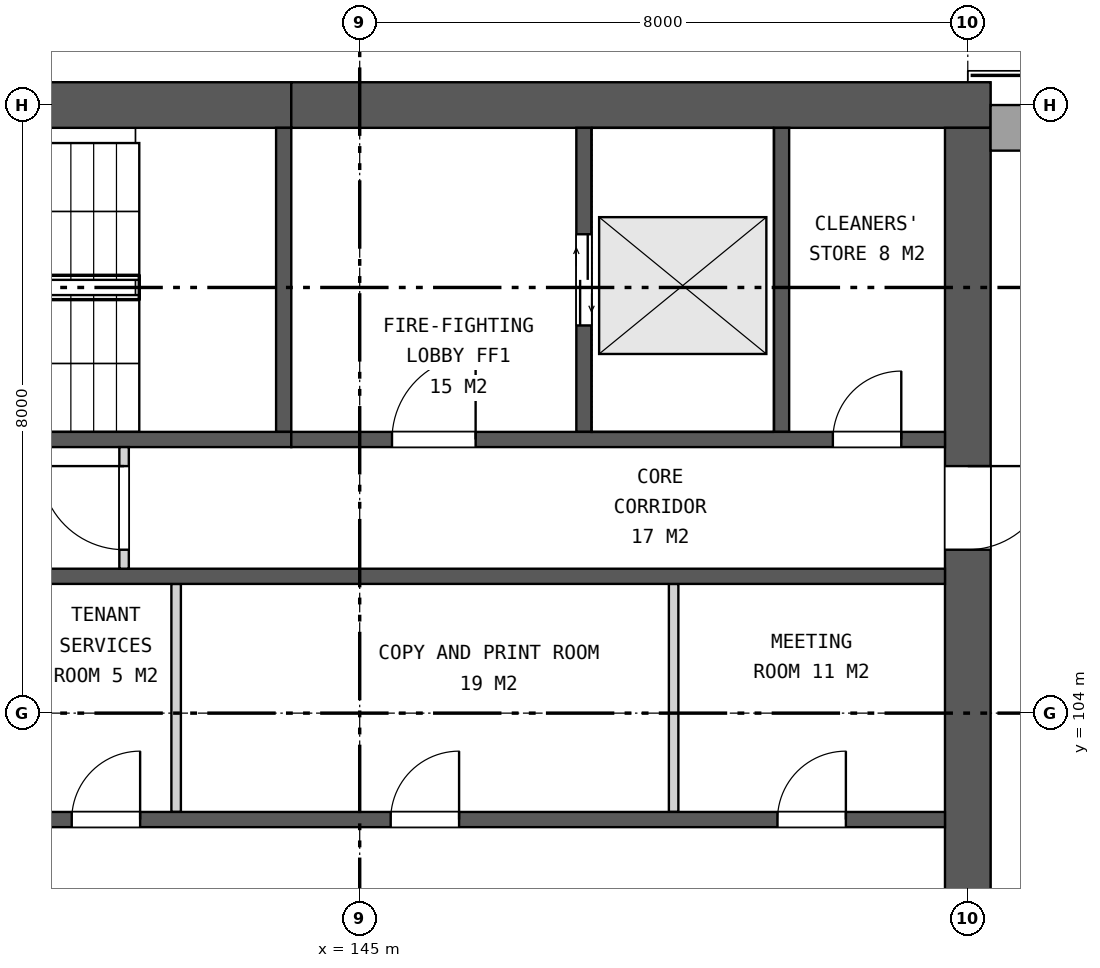
"""IFC4 building model, lengths in metres.
Left out: names, types, materials, properties, quantities, classifications, styles, units other than length and angle.
Written with IfcOpenShell. Run it as: python <this file> out.ifc"""

import sys

from ifc_helpers import new_model, si_unit, direction, frame, frame_2d, origin, place, context, subcontext, project, spatial, rectangle, extrude, element, fill, save


model = new_model("IFC4")
c1 = context("Model", 3, precision=1e-05, world=origin(), true_north=direction((0.0, 1.0)))
c2 = subcontext(c1, "Body", "Model", "MODEL_VIEW")
j1 = project(units=[si_unit("LENGTHUNIT", "METRE"), si_unit("PLANEANGLEUNIT", "RADIAN")], contexts=[c1])
p1 = place(None, origin())
s1 = spatial("IfcSite", under=j1, at=p1, CompositionType="ELEMENT")
p2 = place(p1, origin())
s2 = spatial("IfcBuilding", under=s1, at=p2, CompositionType="ELEMENT")
p3 = place(p2, frame((0.0, 0.0, 178.9)))
s3 = spatial("IfcBuildingStorey", under=s2, at=p3, CompositionType="ELEMENT", Elevation=178.9)
p4 = place(p3, frame((137.0, 112.0, 0.0), z_axis=(0.0, 0.0, 1.0), x_axis=(1.0, 0.0, 0.0)))
e1 = element("IfcWall", 1, at=p4, inside=s3, PredefinedType="SHEAR", context=c2, shape_type="SweptSolid", body=[
    extrude(rectangle(XDim=7.1, YDim=0.6, at=frame_2d((3.55, 0.0))), origin(), (0.0, 0.0, 1.0), 4.2),
])
p5 = place(p3, frame((144.1, 112.0, 0.0), z_axis=(0.0, 0.0, 1.0), x_axis=(1.0, 0.0, 0.0)))
e2 = element("IfcWall", 2, at=p5, inside=s3, PredefinedType="SHEAR", context=c2, shape_type="SweptSolid", body=[
    extrude(rectangle(XDim=9.2, YDim=0.6, at=frame_2d((4.6, 0.0))), origin(), (0.0, 0.0, 1.0), 4.2),
])
p6 = place(p3, frame((153.0, 88.3, 0.0), z_axis=(0.0, 0.0, 1.0), x_axis=(0.0, 1.0, 0.0)))
e3 = element("IfcWall", 3, at=p6, inside=s3, PredefinedType="SHEAR", context=c2, shape_type="SweptSolid", body=[
    extrude(rectangle(XDim=23.4, YDim=0.6, at=frame_2d((11.7, 0.0))), origin(), (0.0, 0.0, 1.0), 4.2),
])
p7 = place(p6, frame((10.5, 0.0, 0.0)))
e4 = element("IfcOpeningElement", 4, at=p7, cuts=e3, PredefinedType="OPENING", context=c2, shape_type="SweptSolid", body=[
    extrude(rectangle(XDim=2.4, YDim=2.4, at=frame_2d((1.2, 1.2))), frame((0.0, 0.31, 0.0), z_axis=(0.0, -1.0, 0.0), x_axis=(1.0, 0.0, 0.0)), (0.0, 0.0, 1.0), 0.62),
])
p8 = place(p6, frame((17.85, 0.0, 0.0)))
e5 = element("IfcOpeningElement", 5, at=p8, cuts=e3, PredefinedType="OPENING", context=c2, shape_type="SweptSolid", body=[
    extrude(rectangle(XDim=1.1, YDim=2.1, at=frame_2d((0.55, 1.05))), frame((0.0, 0.31, 0.0), z_axis=(0.0, -1.0, 0.0), x_axis=(1.0, 0.0, 0.0)), (0.0, 0.0, 1.0), 0.62),
])
for number, where, z_axis, x_axis in (
    (6, (142.585, 102.7, 0.0), (0.0, 0.0, 1.0), (0.0, 1.0, 0.0)),
    (7, (149.13, 102.7, 0.0), (0.0, 0.0, 1.0), (0.0, 1.0, 0.0)),
):
    element("IfcWall", number, at=place(p3, frame(where, z_axis=z_axis, x_axis=x_axis)), inside=s3, PredefinedType="PARTITIONING", context=c2, shape_type="SweptSolid", body=[
        extrude(rectangle(XDim=3.0, YDim=0.125, at=frame_2d((1.5, 0.0))), origin(), (0.0, 0.0, 1.0), 4.2),
    ])
p9 = place(p3, frame((140.6, 102.6, 0.0), z_axis=(0.0, 0.0, 1.0), x_axis=(1.0, 0.0, 0.0)))
e8 = element("IfcWall", 8, at=p9, inside=s3, PredefinedType="SHEAR", context=c2, shape_type="SweptSolid", body=[
    extrude(rectangle(XDim=12.1, YDim=0.2, at=frame_2d((6.05, 0.0))), origin(), (0.0, 0.0, 1.0), 4.2),
])
p10 = place(p9, frame((0.611, 0.0, 0.0)))
e9 = element("IfcOpeningElement", 9, at=p10, cuts=e8, PredefinedType="OPENING", context=c2, shape_type="SweptSolid", body=[
    extrude(rectangle(XDim=0.9, YDim=2.1, at=frame_2d((0.45, 1.05))), frame((0.0, 0.11, 0.0), z_axis=(0.0, -1.0, 0.0), x_axis=(1.0, 0.0, 0.0)), (0.0, 0.0, 1.0), 0.22),
])
p11 = place(p9, frame((4.808, 0.0, 0.0)))
e10 = element("IfcOpeningElement", 10, at=p11, cuts=e8, PredefinedType="OPENING", context=c2, shape_type="SweptSolid", body=[
    extrude(rectangle(XDim=0.9, YDim=2.1, at=frame_2d((0.45, 1.05))), frame((0.0, 0.11, 0.0), z_axis=(0.0, -1.0, 0.0), x_axis=(1.0, 0.0, 0.0)), (0.0, 0.0, 1.0), 0.22),
])
p12 = place(p9, frame((9.896, 0.0, 0.0)))
e11 = element("IfcOpeningElement", 11, at=p12, cuts=e8, PredefinedType="OPENING", context=c2, shape_type="SweptSolid", body=[
    extrude(rectangle(XDim=0.9, YDim=2.1, at=frame_2d((0.45, 1.05))), frame((0.0, 0.11, 0.0), z_axis=(0.0, -1.0, 0.0), x_axis=(1.0, 0.0, 0.0)), (0.0, 0.0, 1.0), 0.22),
])
p13 = place(p3, frame((137.3, 105.8, 0.0), z_axis=(0.0, 0.0, 1.0), x_axis=(1.0, 0.0, 0.0)))
e12 = element("IfcWall", 12, at=p13, inside=s3, PredefinedType="SHEAR", context=c2, shape_type="SweptSolid", body=[
    extrude(rectangle(XDim=15.4, YDim=0.2, at=frame_2d((7.7, 0.0))), origin(), (0.0, 0.0, 1.0), 4.2),
])
p14 = place(p13, frame((0.95, 0.0, 0.0)))
e13 = element("IfcOpeningElement", 13, at=p14, cuts=e12, PredefinedType="OPENING", context=c2, shape_type="SweptSolid", body=[
    extrude(rectangle(XDim=1.1, YDim=2.1, at=frame_2d((0.55, 1.05))), frame((0.0, 0.11, 0.0), z_axis=(0.0, -1.0, 0.0), x_axis=(1.0, 0.0, 0.0)), (0.0, 0.0, 1.0), 0.22),
])
p15 = place(p3, frame((144.0, 107.7, 0.0), z_axis=(0.0, 0.0, 1.0), x_axis=(0.0, 1.0, 0.0)))
e14 = element("IfcWall", 14, at=p15, inside=s3, PredefinedType="SHEAR", context=c2, shape_type="SweptSolid", body=[
    extrude(rectangle(XDim=4.0, YDim=0.2, at=frame_2d((2.0, 0.0))), origin(), (0.0, 0.0, 1.0), 4.2),
])
p16 = place(p3, frame((147.95, 107.7, 0.0), z_axis=(0.0, 0.0, 1.0), x_axis=(0.0, 1.0, 0.0)))
e15 = element("IfcWall", 15, at=p16, inside=s3, PredefinedType="SHEAR", context=c2, shape_type="SweptSolid", body=[
    extrude(rectangle(XDim=4.0, YDim=0.2, at=frame_2d((2.0, 0.0))), origin(), (0.0, 0.0, 1.0), 4.2),
])
p17 = place(p16, frame((1.4, 0.0, 0.0)))
e16 = element("IfcOpeningElement", 16, at=p17, cuts=e15, PredefinedType="OPENING", context=c2, shape_type="SweptSolid", body=[
    extrude(rectangle(XDim=1.2, YDim=2.1, at=frame_2d((0.6, 1.05))), frame((0.0, 0.11, 0.0), z_axis=(0.0, -1.0, 0.0), x_axis=(1.0, 0.0, 0.0)), (0.0, 0.0, 1.0), 0.22),
])
p18 = place(p3, frame((150.55, 107.7, 0.0), z_axis=(0.0, 0.0, 1.0), x_axis=(0.0, 1.0, 0.0)))
e17 = element("IfcWall", 17, at=p18, inside=s3, PredefinedType="SHEAR", context=c2, shape_type="SweptSolid", body=[
    extrude(rectangle(XDim=4.0, YDim=0.2, at=frame_2d((2.0, 0.0))), origin(), (0.0, 0.0, 1.0), 4.2),
])
p19 = place(p3, frame((137.3, 107.6, 0.0), z_axis=(0.0, 0.0, 1.0), x_axis=(1.0, 0.0, 0.0)))
e18 = element("IfcWall", 18, at=p19, inside=s3, PredefinedType="SHEAR", context=c2, shape_type="SweptSolid", body=[
    extrude(rectangle(XDim=6.8, YDim=0.2, at=frame_2d((3.4, 0.0))), origin(), (0.0, 0.0, 1.0), 4.2),
])
p20 = place(p19, frame((0.15, 0.0, 0.0)))
e19 = element("IfcOpeningElement", 19, at=p20, cuts=e18, PredefinedType="OPENING", context=c2, shape_type="SweptSolid", body=[
    extrude(rectangle(XDim=1.0, YDim=2.1, at=frame_2d((0.5, 1.05))), frame((0.0, 0.11, 0.0), z_axis=(0.0, -1.0, 0.0), x_axis=(1.0, 0.0, 0.0)), (0.0, 0.0, 1.0), 0.22),
])
p21 = place(p3, frame((144.1, 107.6, 0.0), z_axis=(0.0, 0.0, 1.0), x_axis=(1.0, 0.0, 0.0)))
e20 = element("IfcWall", 20, at=p21, inside=s3, PredefinedType="SHEAR", context=c2, shape_type="SweptSolid", body=[
    extrude(rectangle(XDim=8.6, YDim=0.2, at=frame_2d((4.3, 0.0))), origin(), (0.0, 0.0, 1.0), 4.2),
])
p22 = place(p21, frame((1.325, 0.0, 0.0)))
e21 = element("IfcOpeningElement", 21, at=p22, cuts=e20, PredefinedType="OPENING", context=c2, shape_type="SweptSolid", body=[
    extrude(rectangle(XDim=1.1, YDim=2.1, at=frame_2d((0.55, 1.05))), frame((0.0, 0.11, 0.0), z_axis=(0.0, -1.0, 0.0), x_axis=(1.0, 0.0, 0.0)), (0.0, 0.0, 1.0), 0.22),
])
p23 = place(p21, frame((7.125, 0.0, 0.0)))
e22 = element("IfcOpeningElement", 22, at=p23, cuts=e20, PredefinedType="OPENING", context=c2, shape_type="SweptSolid", body=[
    extrude(rectangle(XDim=0.9, YDim=2.1, at=frame_2d((0.45, 1.05))), frame((0.0, 0.11, 0.0), z_axis=(0.0, -1.0, 0.0), x_axis=(1.0, 0.0, 0.0)), (0.0, 0.0, 1.0), 0.22),
])
p24 = place(p3, frame((141.9, 105.9, 0.0), z_axis=(0.0, 0.0, 1.0), x_axis=(0.0, 1.0, 0.0)))
e23 = element("IfcWall", 23, at=p24, inside=s3, PredefinedType="PARTITIONING", context=c2, shape_type="SweptSolid", body=[
    extrude(rectangle(XDim=1.6, YDim=0.125, at=frame_2d((0.8, 0.0))), origin(), (0.0, 0.0, 1.0), 4.2),
])
p25 = place(p24, frame((0.25, 0.0, 0.0)))
e24 = element("IfcOpeningElement", 24, at=p25, cuts=e23, PredefinedType="OPENING", context=c2, shape_type="SweptSolid", body=[
    extrude(rectangle(XDim=1.1, YDim=2.1, at=frame_2d((0.55, 1.05))), frame((0.0, 0.073, 0.0), z_axis=(0.0, -1.0, 0.0), x_axis=(1.0, 0.0, 0.0)), (0.0, 0.0, 1.0), 0.145),
])
p26 = place(p3, frame((153.3, 111.7, 0.0), z_axis=(0.0, 0.0, 1.0), x_axis=(1.0, 0.0, 0.0)))
e25 = element("IfcWall", 25, at=p26, inside=s3, PredefinedType="SOLIDWALL", context=c2, shape_type="SweptSolid", body=[
    extrude(rectangle(XDim=7.7, YDim=0.6, at=frame_2d((3.85, 0.0))), origin(), (0.0, 0.0, 1.0), 0.6),
])
p27 = place(p10, origin())
e26 = element("IfcDoor", 26, at=p27, inside=s3, OperationType="SINGLE_SWING_RIGHT", PredefinedType="DOOR", context=c2, shape_type="SweptSolid", body=[
    extrude(rectangle(XDim=0.9, YDim=2.1, at=frame_2d((0.45, 1.05))), frame((0.0, 0.025, 0.0), z_axis=(0.0, -1.0, 0.0), x_axis=(1.0, 0.0, 0.0)), (0.0, 0.0, 1.0), 0.05),
])
fill(e9, e26)
p28 = place(p11, origin())
e27 = element("IfcDoor", 27, at=p28, inside=s3, OperationType="SINGLE_SWING_RIGHT", PredefinedType="DOOR", context=c2, shape_type="SweptSolid", body=[
    extrude(rectangle(XDim=0.9, YDim=2.1, at=frame_2d((0.45, 1.05))), frame((0.0, 0.025, 0.0), z_axis=(0.0, -1.0, 0.0), x_axis=(1.0, 0.0, 0.0)), (0.0, 0.0, 1.0), 0.05),
])
fill(e10, e27)
p29 = place(p12, origin())
e28 = element("IfcDoor", 28, at=p29, inside=s3, OperationType="SINGLE_SWING_RIGHT", PredefinedType="DOOR", context=c2, shape_type="SweptSolid", body=[
    extrude(rectangle(XDim=0.9, YDim=2.1, at=frame_2d((0.45, 1.05))), frame((0.0, 0.025, 0.0), z_axis=(0.0, -1.0, 0.0), x_axis=(1.0, 0.0, 0.0)), (0.0, 0.0, 1.0), 0.05),
])
fill(e11, e28)
p30 = place(p17, origin())
e29 = element("IfcDoor", 29, at=p30, inside=s3, OperationType="DOUBLE_DOOR_SLIDING", PredefinedType="DOOR", context=c2, shape_type="SweptSolid", body=[
    extrude(rectangle(XDim=1.2, YDim=2.1, at=frame_2d((0.6, 1.05))), frame((0.0, 0.025, 0.0), z_axis=(0.0, -1.0, 0.0), x_axis=(1.0, 0.0, 0.0)), (0.0, 0.0, 1.0), 0.05),
])
fill(e16, e29)
p31 = place(p22, origin())
e30 = element("IfcDoor", 30, at=p31, inside=s3, OperationType="SINGLE_SWING_RIGHT", PredefinedType="DOOR", context=c2, shape_type="SweptSolid", body=[
    extrude(rectangle(XDim=1.1, YDim=2.1, at=frame_2d((0.55, 1.05))), frame((0.0, 0.025, 0.0), z_axis=(0.0, -1.0, 0.0), x_axis=(1.0, 0.0, 0.0)), (0.0, 0.0, 1.0), 0.05),
])
fill(e21, e30)
p32 = place(p23, origin())
e31 = element("IfcDoor", 31, at=p32, inside=s3, OperationType="SINGLE_SWING_RIGHT", PredefinedType="DOOR", context=c2, shape_type="SweptSolid", body=[
    extrude(rectangle(XDim=0.9, YDim=2.1, at=frame_2d((0.45, 1.05))), frame((0.0, 0.025, 0.0), z_axis=(0.0, -1.0, 0.0), x_axis=(1.0, 0.0, 0.0)), (0.0, 0.0, 1.0), 0.05),
])
fill(e22, e31)
p33 = place(p25, origin())
e32 = element("IfcDoor", 32, at=p33, inside=s3, OperationType="SINGLE_SWING_RIGHT", PredefinedType="DOOR", context=c2, shape_type="SweptSolid", body=[
    extrude(rectangle(XDim=1.1, YDim=2.1, at=frame_2d((0.55, 1.05))), frame((0.0, 0.025, 0.0), z_axis=(0.0, -1.0, 0.0), x_axis=(1.0, 0.0, 0.0)), (0.0, 0.0, 1.0), 0.05),
])
fill(e24, e32)
p34 = place(p8, frame((1.1, 0.0, 0.0), z_axis=(0.0, 0.0, 1.0), x_axis=(-1.0, 0.0, 0.0)))
e33 = element("IfcDoor", 33, at=p34, inside=s3, OperationType="SINGLE_SWING_LEFT", PredefinedType="DOOR", context=c2, shape_type="SweptSolid", body=[
    extrude(rectangle(XDim=1.1, YDim=2.1, at=frame_2d((0.55, 1.05))), frame((0.0, 0.025, 0.0), z_axis=(0.0, -1.0, 0.0), x_axis=(1.0, 0.0, 0.0)), (0.0, 0.0, 1.0), 0.05),
])
fill(e5, e33)
save(model, sys.argv[1])
